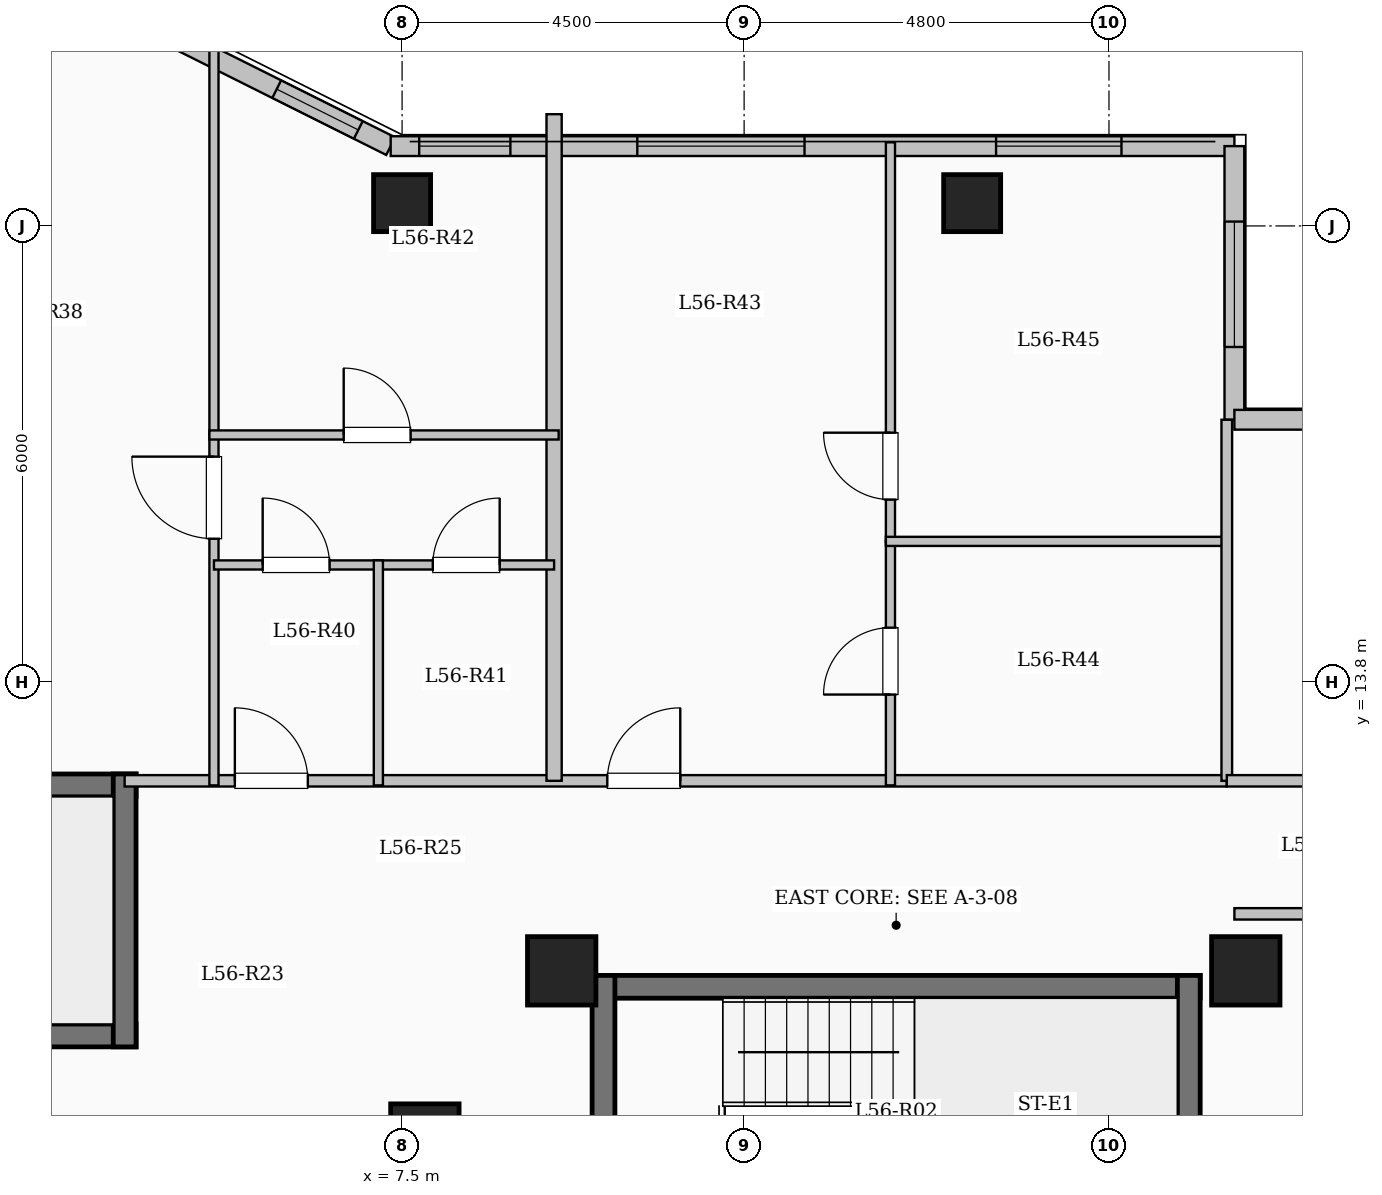
"""IFC4 building model, lengths in metres.
Left out: names, types, materials, properties, quantities, classifications, styles, units other than length and angle.
Written with IfcOpenShell. Run it as: python <this file> out.ifc"""

import sys

from ifc_helpers import new_model, si_unit, direction, frame, frame_2d, origin, origin_2d, place, context, subcontext, project, spatial, rectangle, extrude, element, fill, save


model = new_model("IFC4")
c1 = context("Model", 3, precision=1e-05, world=origin(), true_north=direction((0.0, 1.0)))
c2 = subcontext(c1, "Body", "Model", "MODEL_VIEW")
j1 = project(units=[si_unit("LENGTHUNIT", "METRE"), si_unit("PLANEANGLEUNIT", "RADIAN")], contexts=[c1])
p1 = place(None, origin())
s1 = spatial("IfcSite", under=j1, at=p1, CompositionType="ELEMENT")
p2 = place(p1, origin())
s2 = spatial("IfcBuilding", under=s1, at=p2, CompositionType="ELEMENT")
p3 = place(p2, frame((0.0, 0.0, 207.0)))
s3 = spatial("IfcBuildingStorey", under=s2, at=p3, CompositionType="ELEMENT", Elevation=207.0)
for number, where, z_axis, x_axis in (
    (1, (7.8, 7.8, 0.0), (0.0, 0.0, 1.0), (1.0, 0.0, 0.0)),
    (2, (9.6, 10.0, 0.0), (0.0, 0.0, 1.0), (1.0, 0.0, 0.0)),
    (3, (18.6, 10.0, 0.0), (0.0, 0.0, 1.0), (1.0, 0.0, 0.0)),
):
    element("IfcColumn", number, at=place(p3, frame(where, z_axis=z_axis, x_axis=x_axis)), inside=s3, PredefinedType="COLUMN", context=c2, shape_type="SweptSolid", body=[
        extrude(rectangle(XDim=0.9, YDim=0.9, at=origin_2d()), origin(), (0.0, 0.0, 1.0), 3.35),
    ])
for number, where, z_axis, x_axis in (
    (4, (7.5, 20.1, 0.0), (0.0, 0.0, 1.0), (1.0, 0.0, 0.0)),
    (5, (15.0, 20.1, 0.0), (0.0, 0.0, 1.0), (1.0, 0.0, 0.0)),
):
    element("IfcColumn", number, at=place(p3, frame(where, z_axis=z_axis, x_axis=x_axis)), inside=s3, PredefinedType="COLUMN", context=c2, shape_type="SweptSolid", body=[
        extrude(rectangle(XDim=0.75, YDim=0.75, at=origin_2d()), origin(), (0.0, 0.0, 1.0), 3.35),
    ])
p4 = place(p3, frame((4.35, 22.35, 0.0), z_axis=(0.0, 0.0, 1.0), x_axis=(0.894427191, -0.4472135955, 0.0)))
e6 = element("IfcWall", 6, at=p4, inside=s3, PredefinedType="SOLIDWALL", context=c2, shape_type="SweptSolid", body=[
    extrude(rectangle(XDim=3.354, YDim=0.26, at=frame_2d((1.677, 0.0))), origin(), (0.0, 0.0, 1.0), 3.1),
])
p5 = place(p4, frame((1.678, 0.0, 0.95)))
e7 = element("IfcOpeningElement", 7, at=p5, cuts=e6, PredefinedType="OPENING", context=c2, shape_type="SweptSolid", body=[
    extrude(rectangle(XDim=1.2, YDim=1.5, at=frame_2d((0.6, 0.75))), frame((0.0, 0.14, 0.0), z_axis=(0.0, -1.0, 0.0), x_axis=(1.0, 0.0, 0.0)), (0.0, 0.0, 1.0), 0.28),
])
p6 = place(p3, frame((7.35, 20.85, 0.0), z_axis=(0.0, 0.0, 1.0), x_axis=(1.0, 0.0, 0.0)))
e8 = element("IfcWall", 8, at=p6, inside=s3, PredefinedType="SOLIDWALL", context=c2, shape_type="SweptSolid", body=[
    extrude(rectangle(XDim=11.1, YDim=0.26, at=frame_2d((5.55, 0.0))), origin(), (0.0, 0.0, 1.0), 3.1),
])
p7 = place(p6, frame((0.375, 0.0, 0.95)))
e9 = element("IfcOpeningElement", 9, at=p7, cuts=e8, PredefinedType="OPENING", context=c2, shape_type="SweptSolid", body=[
    extrude(rectangle(XDim=1.2, YDim=1.5, at=frame_2d((0.6, 0.75))), frame((0.0, 0.14, 0.0), z_axis=(0.0, -1.0, 0.0), x_axis=(1.0, 0.0, 0.0)), (0.0, 0.0, 1.0), 0.28),
])
p8 = place(p6, frame((3.245, 0.0, 0.9)))
e10 = element("IfcOpeningElement", 10, at=p8, cuts=e8, PredefinedType="OPENING", context=c2, shape_type="SweptSolid", body=[
    extrude(rectangle(XDim=2.2, YDim=1.75, at=frame_2d((1.1, 0.875))), frame((0.0, 0.14, 0.0), z_axis=(0.0, -1.0, 0.0), x_axis=(1.0, 0.0, 0.0)), (0.0, 0.0, 1.0), 0.28),
])
p9 = place(p6, frame((7.965, 0.0, 0.9)))
e11 = element("IfcOpeningElement", 11, at=p9, cuts=e8, PredefinedType="OPENING", context=c2, shape_type="SweptSolid", body=[
    extrude(rectangle(XDim=1.65, YDim=1.6, at=frame_2d((0.825, 0.8))), frame((0.0, 0.14, 0.0), z_axis=(0.0, -1.0, 0.0), x_axis=(1.0, 0.0, 0.0)), (0.0, 0.0, 1.0), 0.28),
])
p10 = place(p3, frame((18.45, 20.85, 0.0), z_axis=(0.0, 0.0, 1.0), x_axis=(0.0, -1.0, 0.0)))
e12 = element("IfcWall", 12, at=p10, inside=s3, PredefinedType="SOLIDWALL", context=c2, shape_type="SweptSolid", body=[
    extrude(rectangle(XDim=3.6, YDim=0.26, at=frame_2d((1.8, 0.0))), origin(), (0.0, 0.0, 1.0), 3.1),
])
p11 = place(p10, frame((0.992, 0.0, 0.9)))
e13 = element("IfcOpeningElement", 13, at=p11, cuts=e12, PredefinedType="OPENING", context=c2, shape_type="SweptSolid", body=[
    extrude(rectangle(XDim=1.65, YDim=1.6, at=frame_2d((0.825, 0.8))), frame((0.0, 0.14, 0.0), z_axis=(0.0, -1.0, 0.0), x_axis=(1.0, 0.0, 0.0)), (0.0, 0.0, 1.0), 0.28),
])
p12 = place(p3, frame((18.45, 17.25, 0.0), z_axis=(0.0, 0.0, 1.0), x_axis=(1.0, 0.0, 0.0)))
e14 = element("IfcWall", 14, at=p12, inside=s3, PredefinedType="SOLIDWALL", context=c2, shape_type="SweptSolid", body=[
    extrude(rectangle(XDim=5.1, YDim=0.26, at=frame_2d((2.55, 0.0))), origin(), (0.0, 0.0, 1.0), 3.1),
])
p13 = place(p12, frame((1.525, 0.0, 0.9)))
e15 = element("IfcOpeningElement", 15, at=p13, cuts=e14, PredefinedType="OPENING", context=c2, shape_type="SweptSolid", body=[
    extrude(rectangle(XDim=2.0, YDim=1.7, at=frame_2d((1.0, 0.85))), frame((0.0, 0.14, 0.0), z_axis=(0.0, -1.0, 0.0), x_axis=(1.0, 0.0, 0.0)), (0.0, 0.0, 1.0), 0.28),
])
p14 = place(p3, frame((10.0, 9.79, 0.0), z_axis=(0.0, 0.0, 1.0), x_axis=(1.0, 0.0, 0.0)))
e16 = element("IfcWall", 16, at=p14, inside=s3, PredefinedType="SHEAR", context=c2, shape_type="SweptSolid", body=[
    extrude(rectangle(XDim=8.0, YDim=0.3, at=frame_2d((4.0, 0.0))), origin(), (0.0, 0.0, 1.0), 3.35),
])
for number, where, z_axis, x_axis in (
    (17, (10.15, 6.35, 0.0), (0.0, 0.0, 1.0), (0.0, 1.0, 0.0)),
    (18, (17.85, 6.35, 0.0), (0.0, 0.0, 1.0), (0.0, 1.0, 0.0)),
):
    element("IfcWall", number, at=place(p3, frame(where, z_axis=z_axis, x_axis=x_axis)), inside=s3, PredefinedType="SHEAR", context=c2, shape_type="SweptSolid", body=[
        extrude(rectangle(XDim=3.59, YDim=0.3, at=frame_2d((1.795, 0.0))), origin(), (0.0, 0.0, 1.0), 3.35),
    ])
p15 = place(p3, frame((-4.0, 12.44, 0.0), z_axis=(0.0, 0.0, 1.0), x_axis=(1.0, 0.0, 0.0)))
e19 = element("IfcWall", 19, at=p15, inside=s3, PredefinedType="SHEAR", context=c2, shape_type="SweptSolid", body=[
    extrude(rectangle(XDim=8.0, YDim=0.3, at=frame_2d((4.0, 0.0))), origin(), (0.0, 0.0, 1.0), 3.35),
])
p16 = place(p3, frame((-4.0, 9.15, 0.0), z_axis=(0.0, 0.0, 1.0), x_axis=(1.0, 0.0, 0.0)))
e20 = element("IfcWall", 20, at=p16, inside=s3, PredefinedType="SHEAR", context=c2, shape_type="SweptSolid", body=[
    extrude(rectangle(XDim=8.0, YDim=0.3, at=frame_2d((4.0, 0.0))), origin(), (0.0, 0.0, 1.0), 3.35),
])
p17 = place(p16, frame((0.55, 0.0, 0.0)))
e21 = element("IfcOpeningElement", 21, at=p17, cuts=e20, PredefinedType="OPENING", context=c2, shape_type="SweptSolid", body=[
    extrude(rectangle(XDim=1.0, YDim=2.15, at=frame_2d((0.5, 1.075))), frame((0.0, 0.16, 0.0), z_axis=(0.0, -1.0, 0.0), x_axis=(1.0, 0.0, 0.0)), (0.0, 0.0, 1.0), 0.32),
])
p18 = place(p3, frame((3.85, 9.0, 0.0), z_axis=(0.0, 0.0, 1.0), x_axis=(0.0, 1.0, 0.0)))
e22 = element("IfcWall", 22, at=p18, inside=s3, PredefinedType="SHEAR", context=c2, shape_type="SweptSolid", body=[
    extrude(rectangle(XDim=3.59, YDim=0.3, at=frame_2d((1.795, 0.0))), origin(), (0.0, 0.0, 1.0), 3.35),
])
p19 = place(p3, frame((3.85, 12.5, 0.0), z_axis=(0.0, 0.0, 1.0), x_axis=(1.0, 0.0, 0.0)))
e23 = element("IfcWall", 23, at=p19, inside=s3, PredefinedType="PARTITIONING", context=c2, shape_type="SweptSolid", body=[
    extrude(rectangle(XDim=14.5, YDim=0.15, at=frame_2d((7.25, 0.0))), origin(), (0.0, 0.0, 1.0), 3.1),
])
p20 = place(p19, frame((1.45, 0.0, 0.0)))
e24 = element("IfcOpeningElement", 24, at=p20, cuts=e23, PredefinedType="OPENING", context=c2, shape_type="SweptSolid", body=[
    extrude(rectangle(XDim=0.96, YDim=2.15, at=frame_2d((0.48, 1.075))), frame((0.0, 0.085, 0.0), z_axis=(0.0, -1.0, 0.0), x_axis=(1.0, 0.0, 0.0)), (0.0, 0.0, 1.0), 0.17),
])
p21 = place(p19, frame((6.35, 0.0, 0.0)))
e25 = element("IfcOpeningElement", 25, at=p21, cuts=e23, PredefinedType="OPENING", context=c2, shape_type="SweptSolid", body=[
    extrude(rectangle(XDim=0.96, YDim=2.15, at=frame_2d((0.48, 1.075))), frame((0.0, 0.085, 0.0), z_axis=(0.0, -1.0, 0.0), x_axis=(1.0, 0.0, 0.0)), (0.0, 0.0, 1.0), 0.17),
])
p22 = place(p3, frame((9.5, 12.5, 0.0), z_axis=(0.0, 0.0, 1.0), x_axis=(0.0, 1.0, 0.0)))
e26 = element("IfcWall", 26, at=p22, inside=s3, PredefinedType="SOLIDWALL", context=c2, shape_type="SweptSolid", body=[
    extrude(rectangle(XDim=8.77, YDim=0.2, at=frame_2d((4.385, 0.0))), origin(), (0.0, 0.0, 1.0), 3.1),
])
p23 = place(p3, frame((5.025, 12.44, 0.0), z_axis=(0.0, 0.0, 1.0), x_axis=(0.0, 1.0, 0.0)))
e27 = element("IfcWall", 27, at=p23, inside=s3, PredefinedType="PARTITIONING", context=c2, shape_type="SweptSolid", body=[
    extrude(rectangle(XDim=9.934, YDim=0.12, at=frame_2d((4.967, 0.0))), origin(), (0.0, 0.0, 1.0), 3.1),
])
p24 = place(p23, frame((3.245, 0.0, 0.0)))
e28 = element("IfcOpeningElement", 28, at=p24, cuts=e27, PredefinedType="OPENING", context=c2, shape_type="SweptSolid", body=[
    extrude(rectangle(XDim=1.08, YDim=2.15, at=frame_2d((0.54, 1.075))), frame((0.0, 0.07, 0.0), z_axis=(0.0, -1.0, 0.0), x_axis=(1.0, 0.0, 0.0)), (0.0, 0.0, 1.0), 0.14),
])
p25 = place(p3, frame((5.025, 15.34, 0.0), z_axis=(0.0, 0.0, 1.0), x_axis=(1.0, 0.0, 0.0)))
e29 = element("IfcWall", 29, at=p25, inside=s3, PredefinedType="PARTITIONING", context=c2, shape_type="SweptSolid", body=[
    extrude(rectangle(XDim=2.163, YDim=0.12, at=frame_2d((1.082, 0.0))), origin(), (0.0, 0.0, 1.0), 2.725),
])
p26 = place(p25, frame((0.641, 0.0, 0.0)))
e30 = element("IfcOpeningElement", 30, at=p26, cuts=e29, PredefinedType="OPENING", context=c2, shape_type="SweptSolid", body=[
    extrude(rectangle(XDim=0.88, YDim=2.1, at=frame_2d((0.44, 1.05))), frame((0.0, 0.07, 0.0), z_axis=(0.0, -1.0, 0.0), x_axis=(1.0, 0.0, 0.0)), (0.0, 0.0, 1.0), 0.14),
])
p27 = place(p3, frame((7.188, 15.34, 0.0), z_axis=(0.0, 0.0, 1.0), x_axis=(1.0, 0.0, 0.0)))
e31 = element("IfcWall", 31, at=p27, inside=s3, PredefinedType="PARTITIONING", context=c2, shape_type="SweptSolid", body=[
    extrude(rectangle(XDim=2.312, YDim=0.12, at=frame_2d((1.156, 0.0))), origin(), (0.0, 0.0, 1.0), 2.725),
])
p28 = place(p27, frame((0.716, 0.0, 0.0)))
e32 = element("IfcOpeningElement", 32, at=p28, cuts=e31, PredefinedType="OPENING", context=c2, shape_type="SweptSolid", body=[
    extrude(rectangle(XDim=0.88, YDim=2.1, at=frame_2d((0.44, 1.05))), frame((0.0, 0.07, 0.0), z_axis=(0.0, -1.0, 0.0), x_axis=(1.0, 0.0, 0.0)), (0.0, 0.0, 1.0), 0.14),
])
p29 = place(p3, frame((4.965, 17.05, 0.0), z_axis=(0.0, 0.0, 1.0), x_axis=(1.0, 0.0, 0.0)))
e33 = element("IfcWall", 33, at=p29, inside=s3, PredefinedType="PARTITIONING", context=c2, shape_type="SweptSolid", body=[
    extrude(rectangle(XDim=4.595, YDim=0.12, at=frame_2d((2.297, 0.0))), origin(), (0.0, 0.0, 1.0), 2.725),
])
p30 = place(p29, frame((1.767, 0.0, 0.0)))
e34 = element("IfcOpeningElement", 34, at=p30, cuts=e33, PredefinedType="OPENING", context=c2, shape_type="SweptSolid", body=[
    extrude(rectangle(XDim=0.88, YDim=2.1, at=frame_2d((0.44, 1.05))), frame((0.0, 0.07, 0.0), z_axis=(0.0, -1.0, 0.0), x_axis=(1.0, 0.0, 0.0)), (0.0, 0.0, 1.0), 0.14),
])
p31 = place(p3, frame((7.188, 12.44, 0.0), z_axis=(0.0, 0.0, 1.0), x_axis=(0.0, 1.0, 0.0)))
e35 = element("IfcWall", 35, at=p31, inside=s3, PredefinedType="PARTITIONING", context=c2, shape_type="SweptSolid", body=[
    extrude(rectangle(XDim=2.96, YDim=0.12, at=frame_2d((1.48, 0.0))), origin(), (0.0, 0.0, 1.0), 2.585),
])
p32 = place(p3, frame((13.925, 12.44, 0.0), z_axis=(0.0, 0.0, 1.0), x_axis=(0.0, 1.0, 0.0)))
e36 = element("IfcWall", 36, at=p32, inside=s3, PredefinedType="PARTITIONING", context=c2, shape_type="SweptSolid", body=[
    extrude(rectangle(XDim=3.21, YDim=0.12, at=frame_2d((1.605, 0.0))), origin(), (0.0, 0.0, 1.0), 3.1),
])
p33 = place(p32, frame((1.195, 0.0, 0.0)))
e37 = element("IfcOpeningElement", 37, at=p33, cuts=e36, PredefinedType="OPENING", context=c2, shape_type="SweptSolid", body=[
    extrude(rectangle(XDim=0.88, YDim=2.1, at=frame_2d((0.44, 1.05))), frame((0.0, 0.07, 0.0), z_axis=(0.0, -1.0, 0.0), x_axis=(1.0, 0.0, 0.0)), (0.0, 0.0, 1.0), 0.14),
])
p34 = place(p3, frame((13.925, 15.65, 0.0), z_axis=(0.0, 0.0, 1.0), x_axis=(0.0, 1.0, 0.0)))
e38 = element("IfcWall", 38, at=p34, inside=s3, PredefinedType="PARTITIONING", context=c2, shape_type="SweptSolid", body=[
    extrude(rectangle(XDim=5.25, YDim=0.12, at=frame_2d((2.625, 0.0))), origin(), (0.0, 0.0, 1.0), 3.1),
])
p35 = place(p34, frame((0.55, 0.0, 0.0)))
e39 = element("IfcOpeningElement", 39, at=p35, cuts=e38, PredefinedType="OPENING", context=c2, shape_type="SweptSolid", body=[
    extrude(rectangle(XDim=0.88, YDim=2.1, at=frame_2d((0.44, 1.05))), frame((0.0, 0.07, 0.0), z_axis=(0.0, -1.0, 0.0), x_axis=(1.0, 0.0, 0.0)), (0.0, 0.0, 1.0), 0.14),
])
p36 = place(p3, frame((13.865, 15.65, 0.0), z_axis=(0.0, 0.0, 1.0), x_axis=(1.0, 0.0, 0.0)))
e40 = element("IfcWall", 40, at=p36, inside=s3, PredefinedType="PARTITIONING", context=c2, shape_type="SweptSolid", body=[
    extrude(rectangle(XDim=4.545, YDim=0.12, at=frame_2d((2.272, 0.0))), origin(), (0.0, 0.0, 1.0), 2.725),
])
p37 = place(p3, frame((18.45, 10.75, 0.0), z_axis=(0.0, 0.0, 1.0), x_axis=(1.0, 0.0, 0.0)))
e41 = element("IfcWall", 41, at=p37, inside=s3, PredefinedType="PARTITIONING", context=c2, shape_type="SweptSolid", body=[
    extrude(rectangle(XDim=5.13, YDim=0.15, at=frame_2d((2.565, 0.0))), origin(), (0.0, 0.0, 1.0), 3.1),
])
p38 = place(p3, frame((18.35, 12.5, 0.0), z_axis=(0.0, 0.0, 1.0), x_axis=(0.0, 1.0, 0.0)))
e42 = element("IfcWall", 42, at=p38, inside=s3, PredefinedType="PARTITIONING", context=c2, shape_type="SweptSolid", body=[
    extrude(rectangle(XDim=4.75, YDim=0.14, at=frame_2d((2.375, 0.0))), origin(), (0.0, 0.0, 1.0), 3.1),
])
p39 = place(p3, frame((18.35, 12.5, 0.0), z_axis=(0.0, 0.0, 1.0), x_axis=(1.0, 0.0, 0.0)))
e43 = element("IfcWall", 43, at=p39, inside=s3, PredefinedType="PARTITIONING", context=c2, shape_type="SweptSolid", body=[
    extrude(rectangle(XDim=5.23, YDim=0.15, at=frame_2d((2.615, 0.0))), origin(), (0.0, 0.0, 1.0), 3.1),
])
p40 = place(p39, frame((2.14, 0.0, 0.0)))
e44 = element("IfcOpeningElement", 44, at=p40, cuts=e43, PredefinedType="OPENING", context=c2, shape_type="SweptSolid", body=[
    extrude(rectangle(XDim=0.95, YDim=2.15, at=frame_2d((0.475, 1.075))), frame((0.0, 0.085, 0.0), z_axis=(0.0, -1.0, 0.0), x_axis=(1.0, 0.0, 0.0)), (0.0, 0.0, 1.0), 0.17),
])
p41 = place(p5, origin())
e45 = element("IfcWindow", 45, at=p41, inside=s3, PartitioningType="SINGLE_PANEL", PredefinedType="WINDOW", context=c2, shape_type="SweptSolid", body=[
    extrude(rectangle(XDim=1.2, YDim=1.5, at=frame_2d((0.6, 0.75))), frame((0.0, 0.03, 0.0), z_axis=(0.0, -1.0, 0.0), x_axis=(1.0, 0.0, 0.0)), (0.0, 0.0, 1.0), 0.06),
])
fill(e7, e45)
p42 = place(p7, origin())
e46 = element("IfcWindow", 46, at=p42, inside=s3, PartitioningType="SINGLE_PANEL", PredefinedType="WINDOW", context=c2, shape_type="SweptSolid", body=[
    extrude(rectangle(XDim=1.2, YDim=1.5, at=frame_2d((0.6, 0.75))), frame((0.0, 0.03, 0.0), z_axis=(0.0, -1.0, 0.0), x_axis=(1.0, 0.0, 0.0)), (0.0, 0.0, 1.0), 0.06),
])
fill(e9, e46)
p43 = place(p8, origin())
e47 = element("IfcWindow", 47, at=p43, inside=s3, PartitioningType="SINGLE_PANEL", PredefinedType="WINDOW", context=c2, shape_type="SweptSolid", body=[
    extrude(rectangle(XDim=2.2, YDim=1.75, at=frame_2d((1.1, 0.875))), frame((0.0, 0.03, 0.0), z_axis=(0.0, -1.0, 0.0), x_axis=(1.0, 0.0, 0.0)), (0.0, 0.0, 1.0), 0.06),
])
fill(e10, e47)
p44 = place(p9, origin())
e48 = element("IfcWindow", 48, at=p44, inside=s3, PartitioningType="SINGLE_PANEL", PredefinedType="WINDOW", context=c2, shape_type="SweptSolid", body=[
    extrude(rectangle(XDim=1.65, YDim=1.6, at=frame_2d((0.825, 0.8))), frame((0.0, 0.03, 0.0), z_axis=(0.0, -1.0, 0.0), x_axis=(1.0, 0.0, 0.0)), (0.0, 0.0, 1.0), 0.06),
])
fill(e11, e48)
p45 = place(p11, origin())
e49 = element("IfcWindow", 49, at=p45, inside=s3, PartitioningType="SINGLE_PANEL", PredefinedType="WINDOW", context=c2, shape_type="SweptSolid", body=[
    extrude(rectangle(XDim=1.65, YDim=1.6, at=frame_2d((0.825, 0.8))), frame((0.0, 0.03, 0.0), z_axis=(0.0, -1.0, 0.0), x_axis=(1.0, 0.0, 0.0)), (0.0, 0.0, 1.0), 0.06),
])
fill(e13, e49)
p46 = place(p20, origin())
e50 = element("IfcDoor", 50, at=p46, inside=s3, OperationType="SINGLE_SWING_LEFT", PredefinedType="DOOR", context=c2, shape_type="SweptSolid", body=[
    extrude(rectangle(XDim=0.96, YDim=2.15, at=frame_2d((0.48, 1.075))), frame((0.0, 0.025, 0.0), z_axis=(0.0, -1.0, 0.0), x_axis=(1.0, 0.0, 0.0)), (0.0, 0.0, 1.0), 0.05),
])
fill(e24, e50)
p47 = place(p24, origin())
e51 = element("IfcDoor", 51, at=p47, inside=s3, OperationType="SINGLE_SWING_RIGHT", PredefinedType="DOOR", context=c2, shape_type="SweptSolid", body=[
    extrude(rectangle(XDim=1.08, YDim=2.15, at=frame_2d((0.54, 1.075))), frame((0.0, 0.025, 0.0), z_axis=(0.0, -1.0, 0.0), x_axis=(1.0, 0.0, 0.0)), (0.0, 0.0, 1.0), 0.05),
])
fill(e28, e51)
p48 = place(p26, origin())
e52 = element("IfcDoor", 52, at=p48, inside=s3, OperationType="SINGLE_SWING_LEFT", PredefinedType="DOOR", context=c2, shape_type="SweptSolid", body=[
    extrude(rectangle(XDim=0.88, YDim=2.1, at=frame_2d((0.44, 1.05))), frame((0.0, 0.025, 0.0), z_axis=(0.0, -1.0, 0.0), x_axis=(1.0, 0.0, 0.0)), (0.0, 0.0, 1.0), 0.05),
])
fill(e30, e52)
p49 = place(p28, origin())
e53 = element("IfcDoor", 53, at=p49, inside=s3, OperationType="SINGLE_SWING_RIGHT", PredefinedType="DOOR", context=c2, shape_type="SweptSolid", body=[
    extrude(rectangle(XDim=0.88, YDim=2.1, at=frame_2d((0.44, 1.05))), frame((0.0, 0.025, 0.0), z_axis=(0.0, -1.0, 0.0), x_axis=(1.0, 0.0, 0.0)), (0.0, 0.0, 1.0), 0.05),
])
fill(e32, e53)
p50 = place(p30, origin())
e54 = element("IfcDoor", 54, at=p50, inside=s3, OperationType="SINGLE_SWING_LEFT", PredefinedType="DOOR", context=c2, shape_type="SweptSolid", body=[
    extrude(rectangle(XDim=0.88, YDim=2.1, at=frame_2d((0.44, 1.05))), frame((0.0, 0.025, 0.0), z_axis=(0.0, -1.0, 0.0), x_axis=(1.0, 0.0, 0.0)), (0.0, 0.0, 1.0), 0.05),
])
fill(e34, e54)
p51 = place(p21, origin())
e55 = element("IfcDoor", 55, at=p51, inside=s3, OperationType="SINGLE_SWING_RIGHT", PredefinedType="DOOR", context=c2, shape_type="SweptSolid", body=[
    extrude(rectangle(XDim=0.96, YDim=2.15, at=frame_2d((0.48, 1.075))), frame((0.0, 0.025, 0.0), z_axis=(0.0, -1.0, 0.0), x_axis=(1.0, 0.0, 0.0)), (0.0, 0.0, 1.0), 0.05),
])
fill(e25, e55)
p52 = place(p33, origin())
e56 = element("IfcDoor", 56, at=p52, inside=s3, OperationType="SINGLE_SWING_LEFT", PredefinedType="DOOR", context=c2, shape_type="SweptSolid", body=[
    extrude(rectangle(XDim=0.88, YDim=2.1, at=frame_2d((0.44, 1.05))), frame((0.0, 0.025, 0.0), z_axis=(0.0, -1.0, 0.0), x_axis=(1.0, 0.0, 0.0)), (0.0, 0.0, 1.0), 0.05),
])
fill(e37, e56)
p53 = place(p35, origin())
e57 = element("IfcDoor", 57, at=p53, inside=s3, OperationType="SINGLE_SWING_RIGHT", PredefinedType="DOOR", context=c2, shape_type="SweptSolid", body=[
    extrude(rectangle(XDim=0.88, YDim=2.1, at=frame_2d((0.44, 1.05))), frame((0.0, 0.025, 0.0), z_axis=(0.0, -1.0, 0.0), x_axis=(1.0, 0.0, 0.0)), (0.0, 0.0, 1.0), 0.05),
])
fill(e39, e57)
save(model, sys.argv[1])
